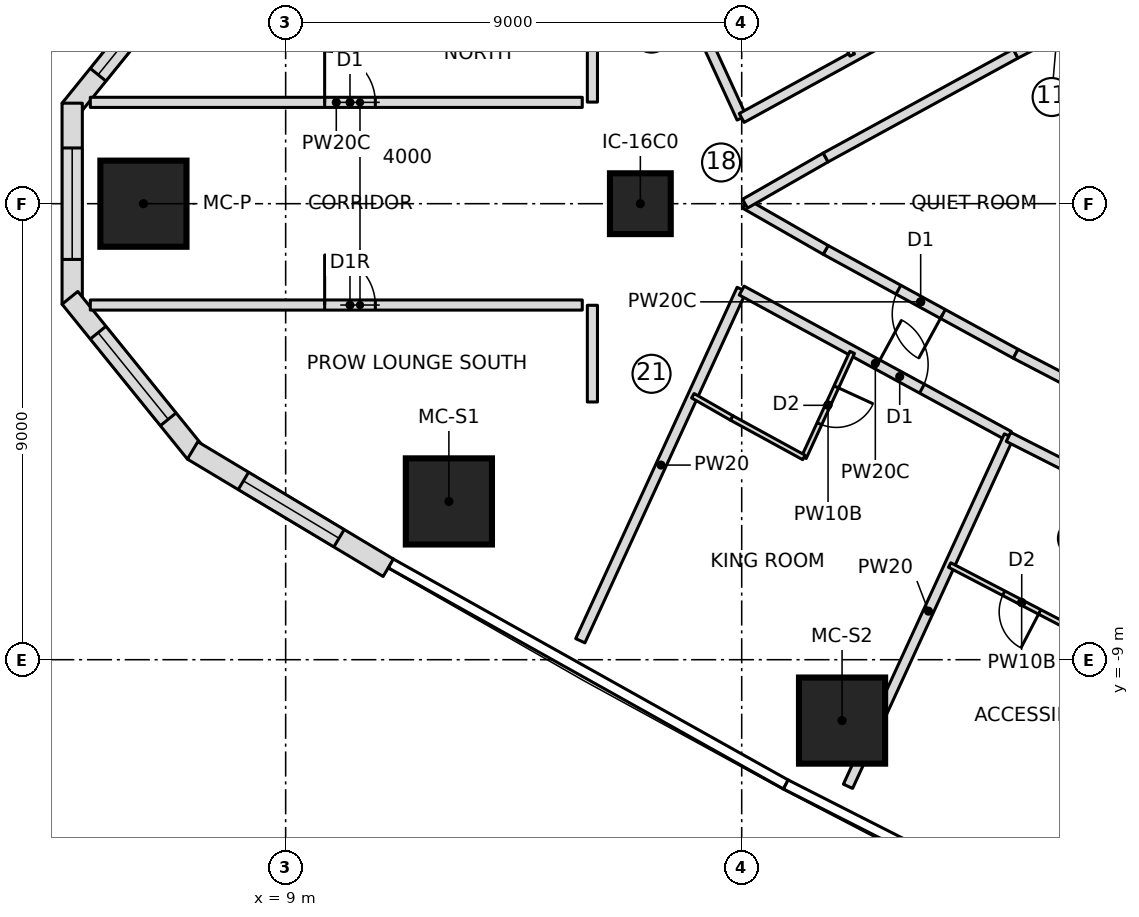
"""IFC4 building model, lengths in metres.
Left out: names, types, materials, properties, quantities, classifications, styles, units other than length and angle.
Written with IfcOpenShell. Run it as: python <this file> out.ifc"""

import sys

from ifc_helpers import new_model, si_unit, direction, frame, frame_2d, origin, origin_2d, place, context, subcontext, project, spatial, polyline, rectangle, outline, extrude, element, fill, save


model = new_model("IFC4")
c1 = context("Model", 3, precision=1e-05, world=origin(), true_north=direction((0.0, 1.0)))
c2 = subcontext(c1, "Body", "Model", "MODEL_VIEW")
j1 = project(units=[si_unit("LENGTHUNIT", "METRE"), si_unit("PLANEANGLEUNIT", "RADIAN")], contexts=[c1])
p1 = place(None, origin())
s1 = spatial("IfcSite", under=j1, at=p1, CompositionType="ELEMENT")
p2 = place(p1, origin())
s2 = spatial("IfcBuilding", under=s1, at=p2, CompositionType="ELEMENT")
p3 = place(p2, frame((0.0, 0.0, 102.65)))
s3 = spatial("IfcBuildingStorey", under=s2, at=p3, CompositionType="ELEMENT", Elevation=102.65)
for number, where, z_axis, x_axis in (
    (1, (6.193, 0.0, 0.0), (0.0, 0.0, 1.0), (1.0, 0.0, 0.0)),
    (2, (12.221, -5.876, 0.0), (0.0, 0.0, 1.0), (1.0, 0.0, 0.0)),
    (3, (19.981, -10.202, 0.0), (0.0, 0.0, 1.0), (1.0, 0.0, 0.0)),
):
    element("IfcColumn", number, at=place(p3, frame(where, z_axis=z_axis, x_axis=x_axis)), inside=s3, PredefinedType="COLUMN", context=c2, shape_type="SweptSolid", body=[
        extrude(rectangle(XDim=1.7, YDim=1.7, at=origin_2d()), origin(), (0.0, 0.0, 1.0), 3.55),
    ])
p4 = place(p3, frame((16.0, 0.0, 0.0), z_axis=(0.0, 0.0, 1.0), x_axis=(1.0, 0.0, 0.0)))
e4 = element("IfcColumn", 4, at=p4, inside=s3, PredefinedType="COLUMN", context=c2, shape_type="SweptSolid", body=[
    extrude(rectangle(XDim=1.2, YDim=1.2, at=origin_2d()), origin(), (0.0, 0.0, 1.0), 3.55),
])
p5 = place(p3, frame((7.194, 4.888, 0.0), z_axis=(0.0, 0.0, 1.0), x_axis=(-0.62903486133, -0.777377092042, 0.0)))
e5 = element("IfcWall", 5, at=p5, inside=s3, PredefinedType="NOTDEFINED", context=c2, shape_type="SweptSolid", body=[
    extrude(outline(polyline([(-0.035, -0.2), (3.897, -0.2), (3.756, 0.2), (0.035, 0.2), (-0.035, -0.2)])), origin(), (0.0, 0.0, 1.0), 3.25),
])
p6 = place(p5, frame((0.813, 0.0, 0.6)))
e6 = element("IfcOpeningElement", 6, at=p6, cuts=e5, PredefinedType="OPENING", context=c2, shape_type="SweptSolid", body=[
    extrude(outline(polyline([(0.0, 1.35), (0.084, 1.771), (0.322, 2.128), (0.679, 2.366), (1.1, 2.45), (1.521, 2.366), (1.878, 2.128), (2.116, 1.771), (2.2, 1.35), (2.2, 1.1), (2.116, 0.679), (1.878, 0.322), (1.521, 0.084), (1.1, 0.0), (0.679, 0.084), (0.322, 0.322), (0.084, 0.679), (0.0, 1.1), (0.0, 1.35)])), frame((0.0, 0.21, 0.0), z_axis=(0.0, -1.0, 0.0), x_axis=(1.0, 0.0, 0.0)), (0.0, 0.0, 1.0), 0.42),
])
p7 = place(p3, frame((4.787, 1.913, 0.0), z_axis=(0.0, 0.0, 1.0), x_axis=(0.0, -1.0, 0.0)))
e7 = element("IfcWall", 7, at=p7, inside=s3, PredefinedType="NOTDEFINED", context=c2, shape_type="SweptSolid", body=[
    extrude(outline(polyline([(-0.071, -0.2), (3.897, -0.2), (3.755, 0.2), (0.071, 0.2), (-0.071, -0.2)])), origin(), (0.0, 0.0, 1.0), 3.25),
])
p8 = place(p7, frame((0.813, 0.0, 0.6)))
e8 = element("IfcOpeningElement", 8, at=p8, cuts=e7, PredefinedType="OPENING", context=c2, shape_type="SweptSolid", body=[
    extrude(outline(polyline([(0.0, 1.35), (0.084, 1.771), (0.322, 2.128), (0.679, 2.366), (1.1, 2.45), (1.521, 2.366), (1.878, 2.128), (2.116, 1.771), (2.2, 1.35), (2.2, 1.1), (2.116, 0.679), (1.878, 0.322), (1.521, 0.084), (1.1, 0.0), (0.679, 0.084), (0.322, 0.322), (0.084, 0.679), (0.0, 1.1), (0.0, 1.35)])), frame((0.0, 0.21, 0.0), z_axis=(0.0, -1.0, 0.0), x_axis=(1.0, 0.0, 0.0)), (0.0, 0.0, 1.0), 0.42),
])
p9 = place(p3, frame((4.787, -1.913, 0.0), z_axis=(0.0, 0.0, 1.0), x_axis=(0.62903486133, -0.777377092042, 0.0)))
e9 = element("IfcWall", 9, at=p9, inside=s3, PredefinedType="NOTDEFINED", context=c2, shape_type="SweptSolid", body=[
    extrude(outline(polyline([(-0.071, -0.2), (3.862, -0.2), (3.791, 0.2), (0.071, 0.2), (-0.071, -0.2)])), origin(), (0.0, 0.0, 1.0), 3.25),
])
p10 = place(p9, frame((0.813, 0.0, 0.6)))
e10 = element("IfcOpeningElement", 10, at=p10, cuts=e9, PredefinedType="OPENING", context=c2, shape_type="SweptSolid", body=[
    extrude(outline(polyline([(0.0, 1.35), (0.084, 1.771), (0.322, 2.128), (0.679, 2.366), (1.1, 2.45), (1.521, 2.366), (1.878, 2.128), (2.116, 1.771), (2.2, 1.35), (2.2, 1.1), (2.116, 0.679), (1.878, 0.322), (1.521, 0.084), (1.1, 0.0), (0.679, 0.084), (0.322, 0.322), (0.084, 0.679), (0.0, 1.1), (0.0, 1.35)])), frame((0.0, 0.21, 0.0), z_axis=(0.0, -1.0, 0.0), x_axis=(1.0, 0.0, 0.0)), (0.0, 0.0, 1.0), 0.42),
])
p11 = place(p3, frame((7.194, -4.888, 0.0), z_axis=(0.0, 0.0, 1.0), x_axis=(0.857550776474, -0.514399325202, 0.0)))
e11 = element("IfcWall", 11, at=p11, inside=s3, PredefinedType="NOTDEFINED", context=c2, shape_type="SweptSolid", body=[
    extrude(outline(polyline([(-0.035, -0.2), (4.468, -0.2), (4.468, 0.2), (0.035, 0.2), (-0.035, -0.2)])), origin(), (0.0, 0.0, 1.0), 3.25),
])
p12 = place(p11, frame((1.134, 0.0, 0.6)))
e12 = element("IfcOpeningElement", 12, at=p12, cuts=e11, PredefinedType="OPENING", context=c2, shape_type="SweptSolid", body=[
    extrude(outline(polyline([(0.0, 1.35), (0.084, 1.771), (0.322, 2.128), (0.679, 2.366), (1.1, 2.45), (1.521, 2.366), (1.878, 2.128), (2.116, 1.771), (2.2, 1.35), (2.2, 1.1), (2.116, 0.679), (1.878, 0.322), (1.521, 0.084), (1.1, 0.0), (0.679, 0.084), (0.322, 0.322), (0.084, 0.679), (0.0, 1.1), (0.0, 1.35)])), frame((0.0, 0.21, 0.0), z_axis=(0.0, -1.0, 0.0), x_axis=(1.0, 0.0, 0.0)), (0.0, 0.0, 1.0), 0.42),
])
p13 = place(p3, frame((5.145, 2.0, 0.0), z_axis=(0.0, 0.0, 1.0), x_axis=(1.0, 0.0, 0.0)))
e13 = element("IfcWall", 13, at=p13, inside=s3, PredefinedType="PARTITIONING", context=c2, shape_type="SweptSolid", body=[
    extrude(rectangle(XDim=9.709, YDim=0.2, at=frame_2d((4.854, 0.0))), origin(), (0.0, 0.0, 1.0), 3.25),
])
p14 = place(p13, frame((4.625, 0.0, 0.0)))
e14 = element("IfcOpeningElement", 14, at=p14, cuts=e13, PredefinedType="OPENING", context=c2, shape_type="SweptSolid", body=[
    extrude(rectangle(XDim=1.0, YDim=2.1, at=frame_2d((0.5, 1.05))), frame((0.0, 0.11, 0.0), z_axis=(0.0, -1.0, 0.0), x_axis=(1.0, 0.0, 0.0)), (0.0, 0.0, 1.0), 0.22),
])
p15 = place(p3, frame((5.145, -2.0, 0.0), z_axis=(0.0, 0.0, 1.0), x_axis=(1.0, 0.0, 0.0)))
e15 = element("IfcWall", 15, at=p15, inside=s3, PredefinedType="PARTITIONING", context=c2, shape_type="SweptSolid", body=[
    extrude(rectangle(XDim=9.709, YDim=0.2, at=frame_2d((4.854, 0.0))), origin(), (0.0, 0.0, 1.0), 3.25),
])
p16 = place(p15, frame((4.625, 0.0, 0.0)))
e16 = element("IfcOpeningElement", 16, at=p16, cuts=e15, PredefinedType="OPENING", context=c2, shape_type="SweptSolid", body=[
    extrude(rectangle(XDim=1.0, YDim=2.1, at=frame_2d((0.5, 1.05))), frame((0.0, 0.11, 0.0), z_axis=(0.0, -1.0, 0.0), x_axis=(1.0, 0.0, 0.0)), (0.0, 0.0, 1.0), 0.22),
])
p17 = place(p3, frame((14.815, 8.626, 0.0), z_axis=(0.0, 0.0, 1.0), x_axis=(0.417432341259, -0.908708006166, 0.0)))
e17 = element("IfcWall", 17, at=p17, inside=s3, PredefinedType="PARTITIONING", context=c2, shape_type="SweptSolid", body=[
    extrude(rectangle(XDim=7.631, YDim=0.2, at=frame_2d((3.815, 0.0))), origin(), (0.0, 0.0, 1.0), 3.25),
])
p18 = place(p3, frame((18.0, 1.692, 0.0), z_axis=(0.0, 0.0, 1.0), x_axis=(0.876809096721, 0.480838650597, 0.0)))
e18 = element("IfcWall", 18, at=p18, inside=s3, PredefinedType="PARTITIONING", context=c2, shape_type="SweptSolid", body=[
    extrude(rectangle(XDim=6.015, YDim=0.2, at=frame_2d((3.008, 0.0))), origin(), (0.0, 0.0, 1.0), 3.25),
])
p19 = place(p18, frame((3.05, 0.0, 0.0)))
e19 = element("IfcOpeningElement", 19, at=p19, cuts=e18, PredefinedType="OPENING", context=c2, shape_type="SweptSolid", body=[
    extrude(rectangle(XDim=1.0, YDim=2.1, at=frame_2d((0.5, 1.05))), frame((0.0, 0.11, 0.0), z_axis=(0.0, -1.0, 0.0), x_axis=(1.0, 0.0, 0.0)), (0.0, 0.0, 1.0), 0.22),
])
p20 = place(p3, frame((19.228, 5.008, 0.0), z_axis=(0.0, 0.0, 1.0), x_axis=(0.417450047292, -0.908699872354, 0.0)))
e20 = element("IfcWall", 20, at=p20, inside=s3, PredefinedType="PARTITIONING", context=c2, shape_type="SweptSolid", body=[
    extrude(rectangle(XDim=2.283, YDim=0.1, at=frame_2d((1.141, 0.0))), origin(), (0.0, 0.0, 1.0), 3.25),
])
p21 = place(p20, frame((0.75, 0.0, 0.0)))
e21 = element("IfcOpeningElement", 21, at=p21, cuts=e20, PredefinedType="OPENING", context=c2, shape_type="SweptSolid", body=[
    extrude(rectangle(XDim=0.8, YDim=2.1, at=frame_2d((0.4, 1.05))), frame((0.0, 0.06, 0.0), z_axis=(0.0, -1.0, 0.0), x_axis=(1.0, 0.0, 0.0)), (0.0, 0.0, 1.0), 0.12),
])
p22 = place(p3, frame((14.815, -8.626, 0.0), z_axis=(0.0, 0.0, 1.0), x_axis=(0.417432341259, 0.908708006166, 0.0)))
e22 = element("IfcWall", 22, at=p22, inside=s3, PredefinedType="PARTITIONING", context=c2, shape_type="SweptSolid", body=[
    extrude(rectangle(XDim=7.631, YDim=0.2, at=frame_2d((3.815, 0.0))), origin(), (0.0, 0.0, 1.0), 3.25),
])
p23 = place(p3, frame((18.0, -1.715, 0.0), z_axis=(0.0, 0.0, 1.0), x_axis=(0.878415628048, -0.477897462225, 0.0)))
e23 = element("IfcWall", 23, at=p23, inside=s3, PredefinedType="PARTITIONING", context=c2, shape_type="SweptSolid", body=[
    extrude(rectangle(XDim=6.004, YDim=0.2, at=frame_2d((3.002, 0.0))), origin(), (0.0, 0.0, 1.0), 3.25),
])
p24 = place(p23, frame((3.05, 0.0, 0.0)))
e24 = element("IfcOpeningElement", 24, at=p24, cuts=e23, PredefinedType="OPENING", context=c2, shape_type="SweptSolid", body=[
    extrude(rectangle(XDim=1.0, YDim=2.1, at=frame_2d((0.5, 1.05))), frame((0.0, 0.11, 0.0), z_axis=(0.0, -1.0, 0.0), x_axis=(1.0, 0.0, 0.0)), (0.0, 0.0, 1.0), 0.22),
])
p25 = place(p3, frame((20.18, -2.934, 0.0), z_axis=(0.0, 0.0, 1.0), x_axis=(-0.417450047292, -0.908699872354, 0.0)))
e25 = element("IfcWall", 25, at=p25, inside=s3, PredefinedType="PARTITIONING", context=c2, shape_type="SweptSolid", body=[
    extrude(rectangle(XDim=2.283, YDim=0.1, at=frame_2d((1.141, 0.0))), origin(), (0.0, 0.0, 1.0), 3.25),
])
p26 = place(p25, frame((0.75, 0.0, 0.0)))
e26 = element("IfcOpeningElement", 26, at=p26, cuts=e25, PredefinedType="OPENING", context=c2, shape_type="SweptSolid", body=[
    extrude(rectangle(XDim=0.8, YDim=2.1, at=frame_2d((0.4, 1.05))), frame((0.0, 0.06, 0.0), z_axis=(0.0, -1.0, 0.0), x_axis=(1.0, 0.0, 0.0)), (0.0, 0.0, 1.0), 0.12),
])
p27 = place(p3, frame((19.228, -5.008, 0.0), z_axis=(0.0, 0.0, 1.0), x_axis=(-0.877424481957, 0.479714788663, 0.0)))
e27 = element("IfcWall", 27, at=p27, inside=s3, PredefinedType="PARTITIONING", context=c2, shape_type="SweptSolid", body=[
    extrude(rectangle(XDim=1.625, YDim=0.1, at=frame_2d((0.813, 0.0))), origin(), (0.0, 0.0, 1.0), 3.25),
])
p28 = place(p3, frame((17.801, -4.229, 0.0), z_axis=(0.0, 0.0, 1.0), x_axis=(-0.867629162742, 0.497211862248, 0.0)))
e28 = element("IfcWall", 28, at=p28, inside=s3, PredefinedType="PARTITIONING", context=c2, shape_type="SweptSolid", body=[
    extrude(rectangle(XDim=0.882, YDim=0.1, at=frame_2d((0.441, 0.0))), origin(), (0.0, 0.0, 1.0), 3.25),
])
p29 = place(p3, frame((20.098, -11.499, 0.0), z_axis=(0.0, 0.0, 1.0), x_axis=(0.417440028355, 0.908704474913, 0.0)))
e29 = element("IfcWall", 29, at=p29, inside=s3, PredefinedType="PARTITIONING", context=c2, shape_type="SweptSolid", body=[
    extrude(rectangle(XDim=7.61, YDim=0.2, at=frame_2d((3.805, 0.0))), origin(), (0.0, 0.0, 1.0), 3.25),
])
p30 = place(p3, frame((23.266, -4.602, 0.0), z_axis=(0.0, 0.0, 1.0), x_axis=(0.892007141151, -0.452021304958, 0.0)))
e30 = element("IfcWall", 30, at=p30, inside=s3, PredefinedType="PARTITIONING", context=c2, shape_type="SweptSolid", body=[
    extrude(rectangle(XDim=6.004, YDim=0.2, at=frame_2d((3.002, 0.0))), origin(), (0.0, 0.0, 1.0), 3.25),
])
p31 = place(p30, frame((3.7, 0.0, 0.0)))
e31 = element("IfcOpeningElement", 31, at=p31, cuts=e30, PredefinedType="OPENING", context=c2, shape_type="SweptSolid", body=[
    extrude(rectangle(XDim=1.0, YDim=2.1, at=frame_2d((0.5, 1.05))), frame((0.0, 0.11, 0.0), z_axis=(0.0, -1.0, 0.0), x_axis=(1.0, 0.0, 0.0)), (0.0, 0.0, 1.0), 0.22),
])
p32 = place(p3, frame((24.945, -8.612, 0.0), z_axis=(0.0, 0.0, 1.0), x_axis=(-0.886865947566, 0.46202682936, 0.0)))
e32 = element("IfcWall", 32, at=p32, inside=s3, PredefinedType="PARTITIONING", context=c2, shape_type="SweptSolid", body=[
    extrude(rectangle(XDim=3.204, YDim=0.1, at=frame_2d((1.602, 0.0))), origin(), (0.0, 0.0, 1.0), 3.25),
])
p33 = place(p32, frame((1.2, 0.0, 0.0)))
e33 = element("IfcOpeningElement", 33, at=p33, cuts=e32, PredefinedType="OPENING", context=c2, shape_type="SweptSolid", body=[
    extrude(rectangle(XDim=0.8, YDim=2.1, at=frame_2d((0.4, 1.05))), frame((0.0, 0.06, 0.0), z_axis=(0.0, -1.0, 0.0), x_axis=(1.0, 0.0, 0.0)), (0.0, 0.0, 1.0), 0.12),
])
p34 = place(p3, frame((23.407, -2.962, 0.0), z_axis=(0.0, 0.0, 1.0), x_axis=(-0.877465075585, 0.479640533242, 0.0)))
e34 = element("IfcWall", 34, at=p34, inside=s3, PredefinedType="PARTITIONING", context=c2, shape_type="SweptSolid", body=[
    extrude(rectangle(XDim=4.273, YDim=0.2, at=frame_2d((2.137, 0.0))), origin(), (0.0, 0.0, 1.0), 3.25),
])
p35 = place(p34, frame((1.636, 0.0, 0.0)))
e35 = element("IfcOpeningElement", 35, at=p35, cuts=e34, PredefinedType="OPENING", context=c2, shape_type="SweptSolid", body=[
    extrude(rectangle(XDim=1.0, YDim=2.1, at=frame_2d((0.5, 1.05))), frame((0.0, 0.11, 0.0), z_axis=(0.0, -1.0, 0.0), x_axis=(1.0, 0.0, 0.0)), (0.0, 0.0, 1.0), 0.22),
])
for number, where, z_axis, x_axis in (
    (36, (19.657, -0.912, 0.0), (0.0, 0.0, 1.0), (-0.868, 0.497, 0.0)),
    (37, (18.065, 0.0, 0.0), (0.0, 0.0, 1.0), (0.868, 0.497, 0.0)),
):
    element("IfcWall", number, at=place(p3, frame(where, z_axis=z_axis, x_axis=x_axis)), inside=s3, PredefinedType="PARTITIONING", context=c2, shape_type="SweptSolid", body=[
        extrude(rectangle(XDim=1.835, YDim=0.2, at=frame_2d((0.918, 0.0))), origin(), (0.0, 0.0, 1.0), 3.25),
    ])
p36 = place(p3, frame((19.657, 0.912, 0.0), z_axis=(0.0, 0.0, 1.0), x_axis=(0.877465075585, 0.479640533242, 0.0)))
e38 = element("IfcWall", 38, at=p36, inside=s3, PredefinedType="PARTITIONING", context=c2, shape_type="SweptSolid", body=[
    extrude(rectangle(XDim=4.273, YDim=0.2, at=frame_2d((2.137, 0.0))), origin(), (0.0, 0.0, 1.0), 3.25),
])
for number, where, z_axis, x_axis in (
    (39, (23.407, 2.962, 0.0), (0.0, 0.0, 1.0), (0.887, 0.462, 0.0)),
    (40, (26.667, -4.66, 0.0), (0.0, 0.0, 1.0), (-0.887, 0.462, 0.0)),
):
    element("IfcWall", number, at=place(p3, frame(where, z_axis=z_axis, x_axis=x_axis)), inside=s3, PredefinedType="PARTITIONING", context=c2, shape_type="SweptSolid", body=[
        extrude(rectangle(XDim=3.676, YDim=0.2, at=frame_2d((1.838, 0.0))), origin(), (0.0, 0.0, 1.0), 3.25),
    ])
p37 = place(p3, frame((15.054, 3.909, 0.0), z_axis=(0.0, 0.0, 1.0), x_axis=(0.0, -1.0, 0.0)))
e41 = element("IfcWall", 41, at=p37, inside=s3, PredefinedType="PARTITIONING", context=c2, shape_type="SweptSolid", body=[
    extrude(rectangle(XDim=1.904, YDim=0.2, at=frame_2d((0.952, 0.0))), origin(), (0.0, 0.0, 1.0), 3.25),
])
p38 = place(p3, frame((15.054, -2.005, 0.0), z_axis=(0.0, 0.0, 1.0), x_axis=(0.0, -1.0, 0.0)))
e42 = element("IfcWall", 42, at=p38, inside=s3, PredefinedType="PARTITIONING", context=c2, shape_type="SweptSolid", body=[
    extrude(rectangle(XDim=1.908, YDim=0.2, at=frame_2d((0.954, 0.0))), origin(), (0.0, 0.0, 1.0), 3.25),
])
p39 = place(p6, origin())
e43 = element("IfcWindow", 43, at=p39, inside=s3, PartitioningType="SINGLE_PANEL", PredefinedType="WINDOW", context=c2, shape_type="SweptSolid", body=[
    extrude(outline(polyline([(0.0, 1.35), (0.084, 1.771), (0.322, 2.128), (0.679, 2.366), (1.1, 2.45), (1.521, 2.366), (1.878, 2.128), (2.116, 1.771), (2.2, 1.35), (2.2, 1.1), (2.116, 0.679), (1.878, 0.322), (1.521, 0.084), (1.1, 0.0), (0.679, 0.084), (0.322, 0.322), (0.084, 0.679), (0.0, 1.1), (0.0, 1.35)])), frame((0.0, 0.17, 0.0), z_axis=(0.0, -1.0, 0.0), x_axis=(1.0, 0.0, 0.0)), (0.0, 0.0, 1.0), 0.06),
])
fill(e6, e43)
p40 = place(p8, origin())
e44 = element("IfcWindow", 44, at=p40, inside=s3, PartitioningType="SINGLE_PANEL", PredefinedType="WINDOW", context=c2, shape_type="SweptSolid", body=[
    extrude(outline(polyline([(0.0, 1.35), (0.084, 1.771), (0.322, 2.128), (0.679, 2.366), (1.1, 2.45), (1.521, 2.366), (1.878, 2.128), (2.116, 1.771), (2.2, 1.35), (2.2, 1.1), (2.116, 0.679), (1.878, 0.322), (1.521, 0.084), (1.1, 0.0), (0.679, 0.084), (0.322, 0.322), (0.084, 0.679), (0.0, 1.1), (0.0, 1.35)])), frame((0.0, 0.17, 0.0), z_axis=(0.0, -1.0, 0.0), x_axis=(1.0, 0.0, 0.0)), (0.0, 0.0, 1.0), 0.06),
])
fill(e8, e44)
p41 = place(p10, origin())
e45 = element("IfcWindow", 45, at=p41, inside=s3, PartitioningType="SINGLE_PANEL", PredefinedType="WINDOW", context=c2, shape_type="SweptSolid", body=[
    extrude(outline(polyline([(0.0, 1.35), (0.084, 1.771), (0.322, 2.128), (0.679, 2.366), (1.1, 2.45), (1.521, 2.366), (1.878, 2.128), (2.116, 1.771), (2.2, 1.35), (2.2, 1.1), (2.116, 0.679), (1.878, 0.322), (1.521, 0.084), (1.1, 0.0), (0.679, 0.084), (0.322, 0.322), (0.084, 0.679), (0.0, 1.1), (0.0, 1.35)])), frame((0.0, 0.17, 0.0), z_axis=(0.0, -1.0, 0.0), x_axis=(1.0, 0.0, 0.0)), (0.0, 0.0, 1.0), 0.06),
])
fill(e10, e45)
p42 = place(p12, origin())
e46 = element("IfcWindow", 46, at=p42, inside=s3, PartitioningType="SINGLE_PANEL", PredefinedType="WINDOW", context=c2, shape_type="SweptSolid", body=[
    extrude(outline(polyline([(0.0, 1.35), (0.084, 1.771), (0.322, 2.128), (0.679, 2.366), (1.1, 2.45), (1.521, 2.366), (1.878, 2.128), (2.116, 1.771), (2.2, 1.35), (2.2, 1.1), (2.116, 0.679), (1.878, 0.322), (1.521, 0.084), (1.1, 0.0), (0.679, 0.084), (0.322, 0.322), (0.084, 0.679), (0.0, 1.1), (0.0, 1.35)])), frame((0.0, 0.17, 0.0), z_axis=(0.0, -1.0, 0.0), x_axis=(1.0, 0.0, 0.0)), (0.0, 0.0, 1.0), 0.06),
])
fill(e12, e46)
p43 = place(p14, origin())
e47 = element("IfcDoor", 47, at=p43, inside=s3, OperationType="SINGLE_SWING_LEFT", PredefinedType="DOOR", context=c2, shape_type="SweptSolid", body=[
    extrude(rectangle(XDim=1.0, YDim=2.1, at=frame_2d((0.5, 1.05))), frame((0.0, 0.025, 0.0), z_axis=(0.0, -1.0, 0.0), x_axis=(1.0, 0.0, 0.0)), (0.0, 0.0, 1.0), 0.05),
])
fill(e14, e47)
p44 = place(p16, origin())
e48 = element("IfcDoor", 48, at=p44, inside=s3, OperationType="SINGLE_SWING_RIGHT", PredefinedType="DOOR", context=c2, shape_type="SweptSolid", body=[
    extrude(rectangle(XDim=1.0, YDim=2.1, at=frame_2d((0.5, 1.05))), frame((0.0, 0.025, 0.0), z_axis=(0.0, -1.0, 0.0), x_axis=(1.0, 0.0, 0.0)), (0.0, 0.0, 1.0), 0.05),
])
fill(e16, e48)
p45 = place(p26, origin())
e49 = element("IfcDoor", 49, at=p45, inside=s3, OperationType="SINGLE_SWING_LEFT", PredefinedType="DOOR", context=c2, shape_type="SweptSolid", body=[
    extrude(rectangle(XDim=0.8, YDim=2.1, at=frame_2d((0.4, 1.05))), frame((0.0, 0.025, 0.0), z_axis=(0.0, -1.0, 0.0), x_axis=(1.0, 0.0, 0.0)), (0.0, 0.0, 1.0), 0.05),
])
fill(e26, e49)
p46 = place(p24, origin())
e50 = element("IfcDoor", 50, at=p46, inside=s3, OperationType="SINGLE_SWING_LEFT", PredefinedType="DOOR", context=c2, shape_type="SweptSolid", body=[
    extrude(rectangle(XDim=1.0, YDim=2.1, at=frame_2d((0.5, 1.05))), frame((0.0, 0.025, 0.0), z_axis=(0.0, -1.0, 0.0), x_axis=(1.0, 0.0, 0.0)), (0.0, 0.0, 1.0), 0.05),
])
fill(e24, e50)
p47 = place(p33, origin())
e51 = element("IfcDoor", 51, at=p47, inside=s3, OperationType="SINGLE_SWING_LEFT", PredefinedType="DOOR", context=c2, shape_type="SweptSolid", body=[
    extrude(rectangle(XDim=0.8, YDim=2.1, at=frame_2d((0.4, 1.05))), frame((0.0, 0.025, 0.0), z_axis=(0.0, -1.0, 0.0), x_axis=(1.0, 0.0, 0.0)), (0.0, 0.0, 1.0), 0.05),
])
fill(e33, e51)
p48 = place(p35, origin())
e52 = element("IfcDoor", 52, at=p48, inside=s3, OperationType="SINGLE_SWING_LEFT", PredefinedType="DOOR", context=c2, shape_type="SweptSolid", body=[
    extrude(rectangle(XDim=1.0, YDim=2.1, at=frame_2d((0.5, 1.05))), frame((0.0, 0.025, 0.0), z_axis=(0.0, -1.0, 0.0), x_axis=(1.0, 0.0, 0.0)), (0.0, 0.0, 1.0), 0.05),
])
fill(e35, e52)
save(model, sys.argv[1])
